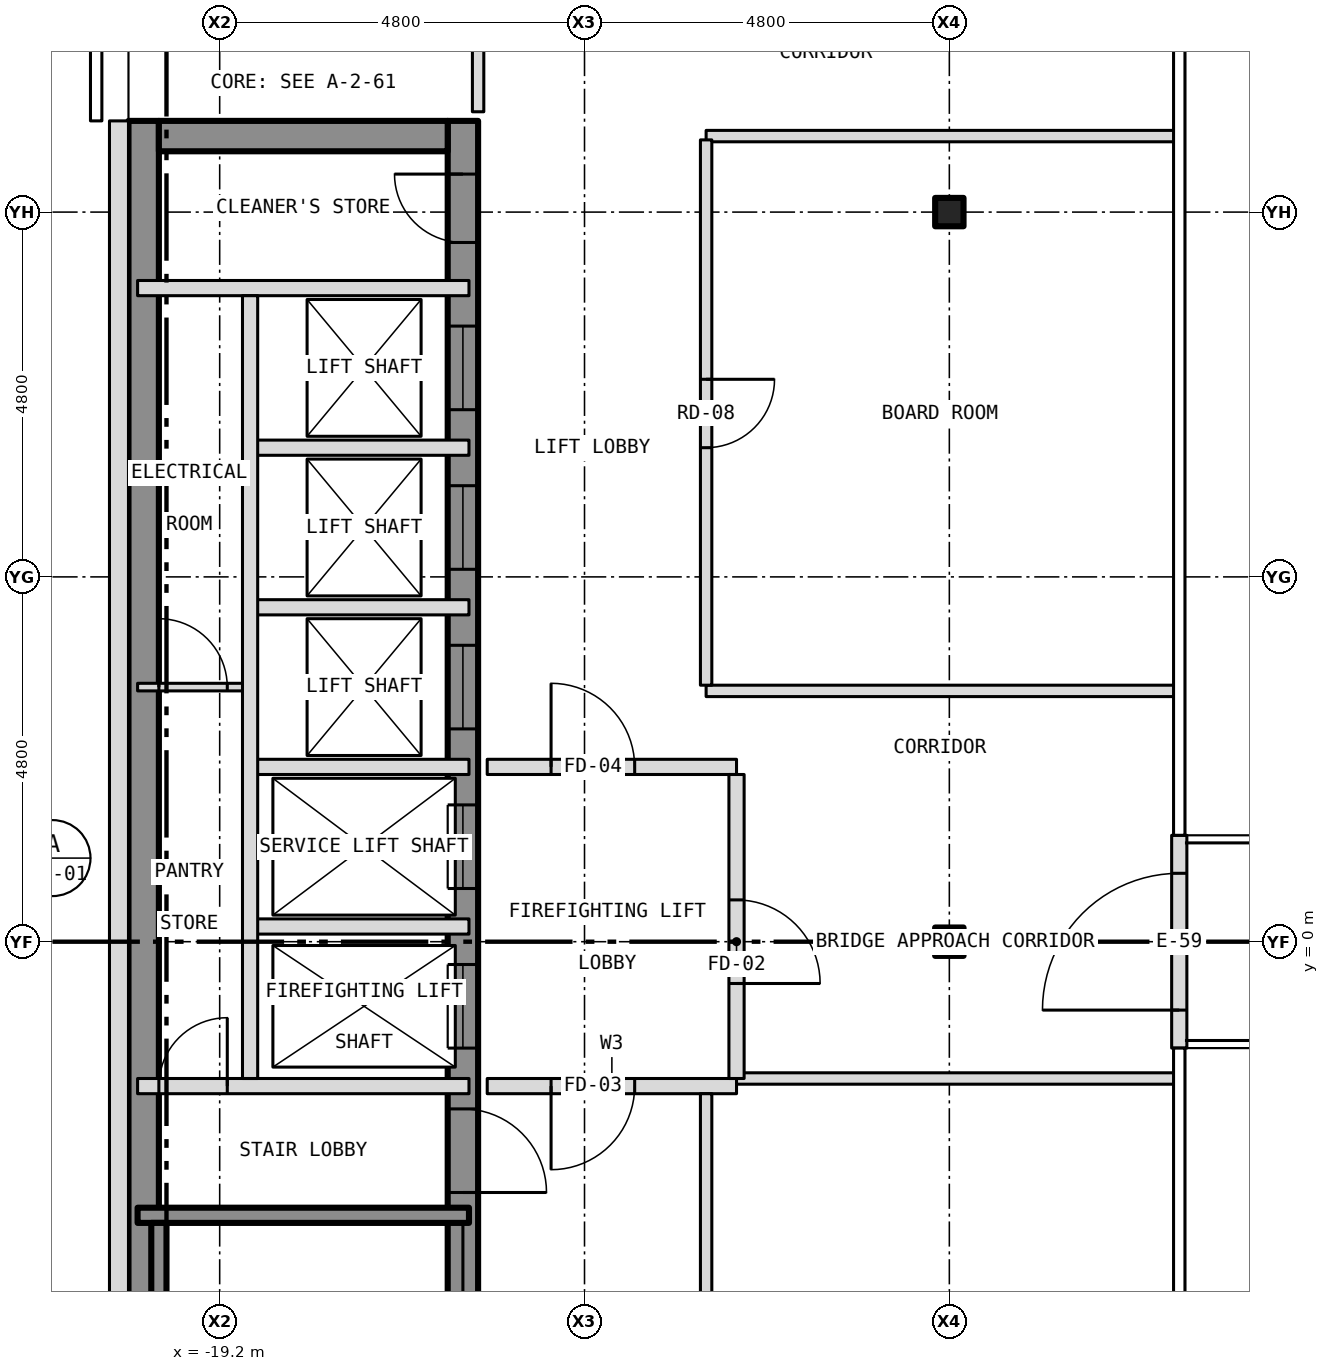
"""IFC4 building model, lengths in metres.
Left out: names, types, materials, properties, quantities, classifications, styles, units other than length and angle.
Written with IfcOpenShell. Run it as: python <this file> out.ifc"""

import sys

from ifc_helpers import new_model, si_unit, direction, frame, frame_2d, origin, origin_2d, place, context, subcontext, project, spatial, rectangle, i_section, extrude, element, fill, save


model = new_model("IFC4")
c1 = context("Model", 3, precision=1e-05, world=origin(), true_north=direction((0.0, 1.0)))
c2 = subcontext(c1, "Body", "Model", "MODEL_VIEW")
j1 = project(units=[si_unit("LENGTHUNIT", "METRE"), si_unit("PLANEANGLEUNIT", "RADIAN")], contexts=[c1])
p1 = place(None, origin())
s1 = spatial("IfcSite", under=j1, at=p1, CompositionType="ELEMENT")
p2 = place(p1, origin())
s2 = spatial("IfcBuilding", under=s1, at=p2, CompositionType="ELEMENT")
p3 = place(p2, frame((0.0, 0.0, 222.5)))
s3 = spatial("IfcBuildingStorey", under=s2, at=p3, CompositionType="ELEMENT", Elevation=222.5)
for number, where, z_axis, x_axis in (
    (1, (-9.6, 0.0, -0.15), (0.0, 0.0, 1.0), (1.0, 0.0, 0.0)),
    (2, (-9.6, 9.6, -0.15), (0.0, 0.0, 1.0), (1.0, 0.0, 0.0)),
):
    element("IfcColumn", number, at=place(p3, frame(where, z_axis=z_axis, x_axis=x_axis)), inside=s3, PredefinedType="COLUMN", context=c2, shape_type="SweptSolid", body=[
        extrude(i_section(OverallWidth=0.373, OverallDepth=0.373, WebThickness=0.016, FlangeThickness=0.026, at=origin_2d()), origin(), (0.0, 0.0, 1.0), 3.5),
    ])
p4 = place(p3, frame((-16.0, -10.8, 0.0), z_axis=(0.0, 0.0, 1.0), x_axis=(0.0, 1.0, 0.0)))
e3 = element("IfcWall", 3, at=p4, inside=s3, PredefinedType="SHEAR", context=c2, shape_type="SweptSolid", body=[
    extrude(rectangle(XDim=21.6, YDim=0.4, at=frame_2d((10.8, 0.0))), origin(), (0.0, 0.0, 1.0), 3.25),
])
p5 = place(p4, frame((9.4, 0.0, 0.0)))
e4 = element("IfcOpeningElement", 4, at=p5, cuts=e3, PredefinedType="OPENING", context=c2, shape_type="SweptSolid", body=[
    extrude(rectangle(XDim=1.1, YDim=2.1, at=frame_2d((0.55, 1.05))), frame((0.0, 0.212, 0.0), z_axis=(0.0, -1.0, 0.0), x_axis=(1.0, 0.0, 0.0)), (0.0, 0.0, 1.0), 0.424),
])
p6 = place(p4, frame((11.5, 0.0, 0.0)))
e5 = element("IfcOpeningElement", 5, at=p6, cuts=e3, PredefinedType="OPENING", context=c2, shape_type="SweptSolid", body=[
    extrude(rectangle(XDim=1.1, YDim=2.1, at=frame_2d((0.55, 1.05))), frame((0.0, 0.212, 0.0), z_axis=(0.0, -1.0, 0.0), x_axis=(1.0, 0.0, 0.0)), (0.0, 0.0, 1.0), 0.424),
])
p7 = place(p4, frame((13.6, 0.0, 0.0)))
e6 = element("IfcOpeningElement", 6, at=p7, cuts=e3, PredefinedType="OPENING", context=c2, shape_type="SweptSolid", body=[
    extrude(rectangle(XDim=1.1, YDim=2.1, at=frame_2d((0.55, 1.05))), frame((0.0, 0.212, 0.0), z_axis=(0.0, -1.0, 0.0), x_axis=(1.0, 0.0, 0.0)), (0.0, 0.0, 1.0), 0.424),
])
p8 = place(p4, frame((15.7, 0.0, 0.0)))
e7 = element("IfcOpeningElement", 7, at=p8, cuts=e3, PredefinedType="OPENING", context=c2, shape_type="SweptSolid", body=[
    extrude(rectangle(XDim=1.1, YDim=2.1, at=frame_2d((0.55, 1.05))), frame((0.0, 0.212, 0.0), z_axis=(0.0, -1.0, 0.0), x_axis=(1.0, 0.0, 0.0)), (0.0, 0.0, 1.0), 0.424),
])
p9 = place(p4, frame((17.8, 0.0, 0.0)))
e8 = element("IfcOpeningElement", 8, at=p9, cuts=e3, PredefinedType="OPENING", context=c2, shape_type="SweptSolid", body=[
    extrude(rectangle(XDim=1.1, YDim=2.1, at=frame_2d((0.55, 1.05))), frame((0.0, 0.212, 0.0), z_axis=(0.0, -1.0, 0.0), x_axis=(1.0, 0.0, 0.0)), (0.0, 0.0, 1.0), 0.424),
])
p10 = place(p4, frame((0.458, 0.0, 0.0)))
e9 = element("IfcOpeningElement", 9, at=p10, cuts=e3, PredefinedType="OPENING", context=c2, shape_type="SweptSolid", body=[
    extrude(rectangle(XDim=1.1, YDim=2.1, at=frame_2d((0.55, 1.05))), frame((0.0, 0.212, 0.0), z_axis=(0.0, -1.0, 0.0), x_axis=(1.0, 0.0, 0.0)), (0.0, 0.0, 1.0), 0.424),
])
p11 = place(p4, frame((7.5, 0.0, 0.0)))
e10 = element("IfcOpeningElement", 10, at=p11, cuts=e3, PredefinedType="OPENING", context=c2, shape_type="SweptSolid", body=[
    extrude(rectangle(XDim=1.1, YDim=2.1, at=frame_2d((0.55, 1.05))), frame((0.0, 0.212, 0.0), z_axis=(0.0, -1.0, 0.0), x_axis=(1.0, 0.0, 0.0)), (0.0, 0.0, 1.0), 0.424),
])
p12 = place(p4, frame((20.0, 0.0, 0.0)))
e11 = element("IfcOpeningElement", 11, at=p12, cuts=e3, PredefinedType="OPENING", context=c2, shape_type="SweptSolid", body=[
    extrude(rectangle(XDim=0.9, YDim=2.1, at=frame_2d((0.45, 1.05))), frame((0.0, 0.212, 0.0), z_axis=(0.0, -1.0, 0.0), x_axis=(1.0, 0.0, 0.0)), (0.0, 0.0, 1.0), 0.424),
])
p13 = place(p3, frame((-20.2, -10.8, 0.0), z_axis=(0.0, 0.0, 1.0), x_axis=(0.0, 1.0, 0.0)))
e12 = element("IfcWall", 12, at=p13, inside=s3, PredefinedType="SHEAR", context=c2, shape_type="SweptSolid", body=[
    extrude(rectangle(XDim=21.6, YDim=0.4, at=frame_2d((10.8, 0.0))), origin(), (0.0, 0.0, 1.0), 3.25),
])
p14 = place(p3, frame((-20.0, 10.6, 0.0), z_axis=(0.0, 0.0, 1.0), x_axis=(1.0, 0.0, 0.0)))
e13 = element("IfcWall", 13, at=p14, inside=s3, PredefinedType="SHEAR", context=c2, shape_type="SweptSolid", body=[
    extrude(rectangle(XDim=3.8, YDim=0.4, at=frame_2d((1.9, 0.0))), origin(), (0.0, 0.0, 1.0), 3.25),
])
p15 = place(p3, frame((-20.525, 10.8, 0.0), z_axis=(0.0, 0.0, 1.0), x_axis=(0.0, -1.0, 0.0)))
e14 = element("IfcWall", 14, at=p15, inside=s3, PredefinedType="SOLIDWALL", context=c2, shape_type="SweptSolid", body=[
    extrude(rectangle(XDim=21.6, YDim=0.25, at=frame_2d((10.8, 0.0))), origin(), (0.0, 0.0, 1.0), 3.5),
])
p16 = place(p15, frame((18.05, 0.0, 1.0)))
e15 = element("IfcOpeningElement", 15, at=p16, cuts=e14, PredefinedType="OPENING", context=c2, shape_type="SweptSolid", body=[
    extrude(rectangle(XDim=0.6, YDim=1.5, at=frame_2d((0.3, 0.75))), frame((0.0, 0.137, 0.0), z_axis=(0.0, -1.0, 0.0), x_axis=(1.0, 0.0, 0.0)), (0.0, 0.0, 1.0), 0.274),
])
p17 = place(p3, frame((-6.575, -1.4, 0.0), z_axis=(0.0, 0.0, 1.0), x_axis=(0.0, 1.0, 0.0)))
e16 = element("IfcWall", 16, at=p17, inside=s3, PredefinedType="SOLIDWALL", context=c2, shape_type="SweptSolid", body=[
    extrude(rectangle(XDim=2.8, YDim=0.2, at=frame_2d((1.4, 0.0))), origin(), (0.0, 0.0, 1.0), 3.5),
])
p18 = place(p17, frame((0.5, 0.0, 0.0)))
e17 = element("IfcOpeningElement", 17, at=p18, cuts=e16, PredefinedType="OPENING", context=c2, shape_type="SweptSolid", body=[
    extrude(rectangle(XDim=1.8, YDim=2.1, at=frame_2d((0.9, 1.05))), frame((0.0, 0.112, 0.0), z_axis=(0.0, -1.0, 0.0), x_axis=(1.0, 0.0, 0.0)), (0.0, 0.0, 1.0), 0.224),
])
p19 = place(p3, frame((-20.28, -3.6, 0.0), z_axis=(0.0, 0.0, 1.0), x_axis=(1.0, 0.0, 0.0)))
e18 = element("IfcWall", 18, at=p19, inside=s3, PredefinedType="SHEAR", context=c2, shape_type="SweptSolid", body=[
    extrude(rectangle(XDim=4.36, YDim=0.2, at=frame_2d((2.18, 0.0))), origin(), (0.0, 0.0, 1.0), 3.25),
])
p20 = place(p3, frame((-20.28, -1.9, 0.0), z_axis=(0.0, 0.0, 1.0), x_axis=(1.0, 0.0, 0.0)))
e19 = element("IfcWall", 19, at=p20, inside=s3, PredefinedType="PARTITIONING", context=c2, shape_type="SweptSolid", body=[
    extrude(rectangle(XDim=4.36, YDim=0.2, at=frame_2d((2.18, 0.0))), origin(), (0.0, 0.0, 1.0), 3.25),
])
p21 = place(p20, frame((0.28, 0.0, 0.0)))
e20 = element("IfcOpeningElement", 20, at=p21, cuts=e19, PredefinedType="OPENING", context=c2, shape_type="SweptSolid", body=[
    extrude(rectangle(XDim=0.9, YDim=2.1, at=frame_2d((0.45, 1.05))), frame((0.0, 0.112, 0.0), z_axis=(0.0, -1.0, 0.0), x_axis=(1.0, 0.0, 0.0)), (0.0, 0.0, 1.0), 0.224),
])
p22 = place(p3, frame((-15.68, -1.9, 0.0), z_axis=(0.0, 0.0, 1.0), x_axis=(1.0, 0.0, 0.0)))
e21 = element("IfcWall", 21, at=p22, inside=s3, PredefinedType="PARTITIONING", context=c2, shape_type="SweptSolid", body=[
    extrude(rectangle(XDim=3.28, YDim=0.2, at=frame_2d((1.64, 0.0))), origin(), (0.0, 0.0, 1.0), 3.35),
])
p23 = place(p22, frame((0.84, 0.0, 0.0)))
e22 = element("IfcOpeningElement", 22, at=p23, cuts=e21, PredefinedType="OPENING", context=c2, shape_type="SweptSolid", body=[
    extrude(rectangle(XDim=1.1, YDim=2.1, at=frame_2d((0.55, 1.05))), frame((0.0, 0.112, 0.0), z_axis=(0.0, -1.0, 0.0), x_axis=(1.0, 0.0, 0.0)), (0.0, 0.0, 1.0), 0.224),
])
p24 = place(p3, frame((-12.4, -1.8, 0.0), z_axis=(0.0, 0.0, 1.0), x_axis=(1.0, 0.0, 0.0)))
e23 = element("IfcWall", 23, at=p24, inside=s3, PredefinedType="PARTITIONING", context=c2, shape_type="SweptSolid", body=[
    extrude(rectangle(XDim=5.78, YDim=0.15, at=frame_2d((2.89, 0.0))), origin(), (0.0, 0.0, 1.0), 3.35),
])
for number, where, z_axis, x_axis in (
    (24, (-18.8, 0.2, 0.0), (0.0, 0.0, 1.0), (1.0, 0.0, 0.0)),
    (25, (-18.8, 2.3, 0.0), (0.0, 0.0, 1.0), (1.0, 0.0, 0.0)),
):
    element("IfcWall", number, at=place(p3, frame(where, z_axis=z_axis, x_axis=x_axis)), inside=s3, PredefinedType="PARTITIONING", context=c2, shape_type="SweptSolid", body=[
        extrude(rectangle(XDim=2.88, YDim=0.2, at=frame_2d((1.44, 0.0))), origin(), (0.0, 0.0, 1.0), 3.25),
    ])
p25 = place(p3, frame((-15.68, 2.3, 0.0), z_axis=(0.0, 0.0, 1.0), x_axis=(1.0, 0.0, 0.0)))
e26 = element("IfcWall", 26, at=p25, inside=s3, PredefinedType="PARTITIONING", context=c2, shape_type="SweptSolid", body=[
    extrude(rectangle(XDim=3.28, YDim=0.2, at=frame_2d((1.64, 0.0))), origin(), (0.0, 0.0, 1.0), 3.35),
])
p26 = place(p25, frame((0.84, 0.0, 0.0)))
e27 = element("IfcOpeningElement", 27, at=p26, cuts=e26, PredefinedType="OPENING", context=c2, shape_type="SweptSolid", body=[
    extrude(rectangle(XDim=1.1, YDim=2.1, at=frame_2d((0.55, 1.05))), frame((0.0, 0.112, 0.0), z_axis=(0.0, -1.0, 0.0), x_axis=(1.0, 0.0, 0.0)), (0.0, 0.0, 1.0), 0.224),
])
p27 = place(p3, frame((-12.8, 3.3, 0.0), z_axis=(0.0, 0.0, 1.0), x_axis=(1.0, 0.0, 0.0)))
e28 = element("IfcWall", 28, at=p27, inside=s3, PredefinedType="PARTITIONING", context=c2, shape_type="SweptSolid", body=[
    extrude(rectangle(XDim=6.18, YDim=0.15, at=frame_2d((3.09, 0.0))), origin(), (0.0, 0.0, 1.0), 3.35),
])
p28 = place(p3, frame((-20.28, 3.35, 0.0), z_axis=(0.0, 0.0, 1.0), x_axis=(1.0, 0.0, 0.0)))
e29 = element("IfcWall", 29, at=p28, inside=s3, PredefinedType="PARTITIONING", context=c2, shape_type="SweptSolid", body=[
    extrude(rectangle(XDim=1.48, YDim=0.1, at=frame_2d((0.74, 0.0))), origin(), (0.0, 0.0, 1.0), 3.25),
])
p29 = place(p28, frame((0.28, 0.0, 0.0)))
e30 = element("IfcOpeningElement", 30, at=p29, cuts=e29, PredefinedType="OPENING", context=c2, shape_type="SweptSolid", body=[
    extrude(rectangle(XDim=0.9, YDim=2.1, at=frame_2d((0.45, 1.05))), frame((0.0, 0.062, 0.0), z_axis=(0.0, -1.0, 0.0), x_axis=(1.0, 0.0, 0.0)), (0.0, 0.0, 1.0), 0.124),
])
for number, where, z_axis, x_axis in (
    (31, (-18.8, 4.4, 0.0), (0.0, 0.0, 1.0), (1.0, 0.0, 0.0)),
    (32, (-18.8, 6.5, 0.0), (0.0, 0.0, 1.0), (1.0, 0.0, 0.0)),
):
    element("IfcWall", number, at=place(p3, frame(where, z_axis=z_axis, x_axis=x_axis)), inside=s3, PredefinedType="PARTITIONING", context=c2, shape_type="SweptSolid", body=[
        extrude(rectangle(XDim=2.88, YDim=0.2, at=frame_2d((1.44, 0.0))), origin(), (0.0, 0.0, 1.0), 3.25),
    ])
p30 = place(p3, frame((-20.28, 8.6, 0.0), z_axis=(0.0, 0.0, 1.0), x_axis=(1.0, 0.0, 0.0)))
e33 = element("IfcWall", 33, at=p30, inside=s3, PredefinedType="PARTITIONING", context=c2, shape_type="SweptSolid", body=[
    extrude(rectangle(XDim=4.36, YDim=0.2, at=frame_2d((2.18, 0.0))), origin(), (0.0, 0.0, 1.0), 3.25),
])
p31 = place(p3, frame((-12.8, 10.6, 0.0), z_axis=(0.0, 0.0, 1.0), x_axis=(1.0, 0.0, 0.0)))
e34 = element("IfcWall", 34, at=p31, inside=s3, PredefinedType="PARTITIONING", context=c2, shape_type="SweptSolid", body=[
    extrude(rectangle(XDim=6.18, YDim=0.15, at=frame_2d((3.09, 0.0))), origin(), (0.0, 0.0, 1.0), 3.35),
])
p32 = place(p3, frame((-20.0, -10.68, 0.0), z_axis=(0.0, 0.0, 1.0), x_axis=(0.0, 1.0, 0.0)))
e35 = element("IfcWall", 35, at=p32, inside=s3, PredefinedType="SHEAR", context=c2, shape_type="SweptSolid", body=[
    extrude(rectangle(XDim=6.98, YDim=0.2, at=frame_2d((3.49, 0.0))), origin(), (0.0, 0.0, 1.0), 3.25),
])
p33 = place(p3, frame((-18.8, -1.8, 0.0), z_axis=(0.0, 0.0, 1.0), x_axis=(0.0, 1.0, 0.0)))
e36 = element("IfcWall", 36, at=p33, inside=s3, PredefinedType="PARTITIONING", context=c2, shape_type="SweptSolid", body=[
    extrude(rectangle(XDim=10.3, YDim=0.2, at=frame_2d((5.15, 0.0))), origin(), (0.0, 0.0, 1.0), 3.25),
])
p34 = place(p3, frame((-15.8, 10.92, 0.0), z_axis=(0.0, 0.0, 1.0), x_axis=(0.0, 1.0, 0.0)))
e37 = element("IfcWall", 37, at=p34, inside=s3, PredefinedType="PARTITIONING", context=c2, shape_type="SweptSolid", body=[
    extrude(rectangle(XDim=1.805, YDim=0.15, at=frame_2d((0.903, 0.0))), origin(), (0.0, 0.0, 1.0), 3.35),
])
p35 = place(p3, frame((-12.8, -10.525, 0.0), z_axis=(0.0, 0.0, 1.0), x_axis=(0.0, 1.0, 0.0)))
e38 = element("IfcWall", 38, at=p35, inside=s3, PredefinedType="PARTITIONING", context=c2, shape_type="SweptSolid", body=[
    extrude(rectangle(XDim=8.525, YDim=0.15, at=frame_2d((4.262, 0.0))), origin(), (0.0, 0.0, 1.0), 3.35),
])
p36 = place(p35, frame((3.825, 0.0, 0.0)))
e39 = element("IfcOpeningElement", 39, at=p36, cuts=e38, PredefinedType="OPENING", context=c2, shape_type="SweptSolid", body=[
    extrude(rectangle(XDim=0.9, YDim=2.1, at=frame_2d((0.45, 1.05))), frame((0.0, 0.087, 0.0), z_axis=(0.0, -1.0, 0.0), x_axis=(1.0, 0.0, 0.0)), (0.0, 0.0, 1.0), 0.174),
])
p37 = place(p3, frame((-12.8, 3.375, 0.0), z_axis=(0.0, 0.0, 1.0), x_axis=(0.0, 1.0, 0.0)))
e40 = element("IfcWall", 40, at=p37, inside=s3, PredefinedType="PARTITIONING", context=c2, shape_type="SweptSolid", body=[
    extrude(rectangle(XDim=7.175, YDim=0.15, at=frame_2d((3.587, 0.0))), origin(), (0.0, 0.0, 1.0), 3.35),
])
p38 = place(p37, frame((3.125, 0.0, 0.0)))
e41 = element("IfcOpeningElement", 41, at=p38, cuts=e40, PredefinedType="OPENING", context=c2, shape_type="SweptSolid", body=[
    extrude(rectangle(XDim=0.9, YDim=2.1, at=frame_2d((0.45, 1.05))), frame((0.0, 0.087, 0.0), z_axis=(0.0, -1.0, 0.0), x_axis=(1.0, 0.0, 0.0)), (0.0, 0.0, 1.0), 0.174),
])
p39 = place(p3, frame((-12.4, -1.8, 0.0), z_axis=(0.0, 0.0, 1.0), x_axis=(0.0, 1.0, 0.0)))
e42 = element("IfcWall", 42, at=p39, inside=s3, PredefinedType="PARTITIONING", context=c2, shape_type="SweptSolid", body=[
    extrude(rectangle(XDim=4.0, YDim=0.2, at=frame_2d((2.0, 0.0))), origin(), (0.0, 0.0, 1.0), 3.35),
])
p40 = place(p39, frame((1.25, 0.0, 0.0)))
e43 = element("IfcOpeningElement", 43, at=p40, cuts=e42, PredefinedType="OPENING", context=c2, shape_type="SweptSolid", body=[
    extrude(rectangle(XDim=1.1, YDim=2.1, at=frame_2d((0.55, 1.05))), frame((0.0, 0.112, 0.0), z_axis=(0.0, -1.0, 0.0), x_axis=(1.0, 0.0, 0.0)), (0.0, 0.0, 1.0), 0.224),
])
p41 = place(p18, origin())
e44 = element("IfcDoor", 44, at=p41, inside=s3, OperationType="DOUBLE_DOOR_DOUBLE_SWING", PredefinedType="DOOR", context=c2, shape_type="SweptSolid", body=[
    extrude(rectangle(XDim=1.8, YDim=2.1, at=frame_2d((0.9, 1.05))), frame((0.0, 0.025, 0.0), z_axis=(0.0, -1.0, 0.0), x_axis=(1.0, 0.0, 0.0)), (0.0, 0.0, 1.0), 0.05),
])
fill(e17, e44)
p42 = place(p5, origin())
e45 = element("IfcDoor", 45, at=p42, inside=s3, OperationType="SLIDING_TO_LEFT", PredefinedType="DOOR", context=c2, shape_type="SweptSolid", body=[
    extrude(rectangle(XDim=1.1, YDim=2.1, at=frame_2d((0.55, 1.05))), frame((0.0, 0.025, 0.0), z_axis=(0.0, -1.0, 0.0), x_axis=(1.0, 0.0, 0.0)), (0.0, 0.0, 1.0), 0.05),
])
fill(e4, e45)
p43 = place(p6, origin())
e46 = element("IfcDoor", 46, at=p43, inside=s3, OperationType="SLIDING_TO_LEFT", PredefinedType="DOOR", context=c2, shape_type="SweptSolid", body=[
    extrude(rectangle(XDim=1.1, YDim=2.1, at=frame_2d((0.55, 1.05))), frame((0.0, 0.025, 0.0), z_axis=(0.0, -1.0, 0.0), x_axis=(1.0, 0.0, 0.0)), (0.0, 0.0, 1.0), 0.05),
])
fill(e5, e46)
p44 = place(p7, origin())
e47 = element("IfcDoor", 47, at=p44, inside=s3, OperationType="SLIDING_TO_LEFT", PredefinedType="DOOR", context=c2, shape_type="SweptSolid", body=[
    extrude(rectangle(XDim=1.1, YDim=2.1, at=frame_2d((0.55, 1.05))), frame((0.0, 0.025, 0.0), z_axis=(0.0, -1.0, 0.0), x_axis=(1.0, 0.0, 0.0)), (0.0, 0.0, 1.0), 0.05),
])
fill(e6, e47)
p45 = place(p8, origin())
e48 = element("IfcDoor", 48, at=p45, inside=s3, OperationType="SLIDING_TO_LEFT", PredefinedType="DOOR", context=c2, shape_type="SweptSolid", body=[
    extrude(rectangle(XDim=1.1, YDim=2.1, at=frame_2d((0.55, 1.05))), frame((0.0, 0.025, 0.0), z_axis=(0.0, -1.0, 0.0), x_axis=(1.0, 0.0, 0.0)), (0.0, 0.0, 1.0), 0.05),
])
fill(e7, e48)
p46 = place(p9, origin())
e49 = element("IfcDoor", 49, at=p46, inside=s3, OperationType="SLIDING_TO_LEFT", PredefinedType="DOOR", context=c2, shape_type="SweptSolid", body=[
    extrude(rectangle(XDim=1.1, YDim=2.1, at=frame_2d((0.55, 1.05))), frame((0.0, 0.025, 0.0), z_axis=(0.0, -1.0, 0.0), x_axis=(1.0, 0.0, 0.0)), (0.0, 0.0, 1.0), 0.05),
])
fill(e8, e49)
p47 = place(p11, origin())
e50 = element("IfcDoor", 50, at=p47, inside=s3, OperationType="SINGLE_SWING_LEFT", PredefinedType="DOOR", context=c2, shape_type="SweptSolid", body=[
    extrude(rectangle(XDim=1.1, YDim=2.1, at=frame_2d((0.55, 1.05))), frame((0.0, 0.025, 0.0), z_axis=(0.0, -1.0, 0.0), x_axis=(1.0, 0.0, 0.0)), (0.0, 0.0, 1.0), 0.05),
])
fill(e10, e50)
p48 = place(p12, origin())
e51 = element("IfcDoor", 51, at=p48, inside=s3, OperationType="SINGLE_SWING_RIGHT", PredefinedType="DOOR", context=c2, shape_type="SweptSolid", body=[
    extrude(rectangle(XDim=0.9, YDim=2.1, at=frame_2d((0.45, 1.05))), frame((0.0, 0.025, 0.0), z_axis=(0.0, -1.0, 0.0), x_axis=(1.0, 0.0, 0.0)), (0.0, 0.0, 1.0), 0.05),
])
fill(e11, e51)
p49 = place(p21, origin())
e52 = element("IfcDoor", 52, at=p49, inside=s3, OperationType="SINGLE_SWING_RIGHT", PredefinedType="DOOR", context=c2, shape_type="SweptSolid", body=[
    extrude(rectangle(XDim=0.9, YDim=2.1, at=frame_2d((0.45, 1.05))), frame((0.0, 0.025, 0.0), z_axis=(0.0, -1.0, 0.0), x_axis=(1.0, 0.0, 0.0)), (0.0, 0.0, 1.0), 0.05),
])
fill(e20, e52)
p50 = place(p29, origin())
e53 = element("IfcDoor", 53, at=p50, inside=s3, OperationType="SINGLE_SWING_LEFT", PredefinedType="DOOR", context=c2, shape_type="SweptSolid", body=[
    extrude(rectangle(XDim=0.9, YDim=2.1, at=frame_2d((0.45, 1.05))), frame((0.0, 0.025, 0.0), z_axis=(0.0, -1.0, 0.0), x_axis=(1.0, 0.0, 0.0)), (0.0, 0.0, 1.0), 0.05),
])
fill(e30, e53)
p51 = place(p40, origin())
e54 = element("IfcDoor", 54, at=p51, inside=s3, OperationType="SINGLE_SWING_LEFT", PredefinedType="DOOR", context=c2, shape_type="SweptSolid", body=[
    extrude(rectangle(XDim=1.1, YDim=2.1, at=frame_2d((0.55, 1.05))), frame((0.0, 0.025, 0.0), z_axis=(0.0, -1.0, 0.0), x_axis=(1.0, 0.0, 0.0)), (0.0, 0.0, 1.0), 0.05),
])
fill(e43, e54)
p52 = place(p23, origin())
e55 = element("IfcDoor", 55, at=p52, inside=s3, OperationType="SINGLE_SWING_LEFT", PredefinedType="DOOR", context=c2, shape_type="SweptSolid", body=[
    extrude(rectangle(XDim=1.1, YDim=2.1, at=frame_2d((0.55, 1.05))), frame((0.0, 0.025, 0.0), z_axis=(0.0, -1.0, 0.0), x_axis=(1.0, 0.0, 0.0)), (0.0, 0.0, 1.0), 0.05),
])
fill(e22, e55)
p53 = place(p26, origin())
e56 = element("IfcDoor", 56, at=p53, inside=s3, OperationType="SINGLE_SWING_LEFT", PredefinedType="DOOR", context=c2, shape_type="SweptSolid", body=[
    extrude(rectangle(XDim=1.1, YDim=2.1, at=frame_2d((0.55, 1.05))), frame((0.0, 0.025, 0.0), z_axis=(0.0, -1.0, 0.0), x_axis=(1.0, 0.0, 0.0)), (0.0, 0.0, 1.0), 0.05),
])
fill(e27, e56)
p54 = place(p38, origin())
e57 = element("IfcDoor", 57, at=p54, inside=s3, OperationType="SINGLE_SWING_RIGHT", PredefinedType="DOOR", context=c2, shape_type="SweptSolid", body=[
    extrude(rectangle(XDim=0.9, YDim=2.1, at=frame_2d((0.45, 1.05))), frame((0.0, 0.025, 0.0), z_axis=(0.0, -1.0, 0.0), x_axis=(1.0, 0.0, 0.0)), (0.0, 0.0, 1.0), 0.05),
])
fill(e41, e57)
save(model, sys.argv[1])
